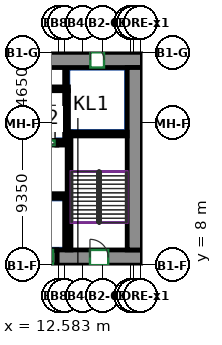
"""IFC4 building model, lengths in metres.
Left out: names, types, materials, properties, quantities, classifications, styles, units other than length and angle.
Written with IfcOpenShell. Run it as: python <this file> out.ifc"""

import sys

from ifc_helpers import new_model, si_unit, direction, frame, frame_2d, origin, place, context, subcontext, project, spatial, rectangle, extrude, source, transform, mapped, element, fill, save


model = new_model("IFC4")
c1 = context("Model", 3, precision=1e-05, world=origin(), true_north=direction((0.0, 1.0)))
c2 = subcontext(c1, "Body", "Model", "MODEL_VIEW")
j1 = project(units=[si_unit("LENGTHUNIT", "METRE"), si_unit("PLANEANGLEUNIT", "RADIAN")], contexts=[c1])
p1 = place(None, origin())
s1 = spatial("IfcSite", under=j1, at=p1, CompositionType="ELEMENT")
p2 = place(p1, origin())
s2 = spatial("IfcBuilding", under=s1, at=p2, CompositionType="ELEMENT")
p3 = place(p2, origin())
s3 = spatial("IfcBuildingStorey", under=s2, at=p3, CompositionType="ELEMENT", Elevation=0.0)
m1 = source(origin(), c2, "Body", "SweptSolid", [
    extrude(rectangle(XDim=5.63, YDim=1.0, at=frame_2d((2.815, 0.0))), origin(), (0.0, 0.0, 1.0), 8.6),
])
p4 = place(p3, frame((12.47, 8.5, 0.0), z_axis=(0.0, 0.0, 1.0), x_axis=(1.0, 0.0, 0.0)))
e1 = element("IfcWall", 1, at=p4, inside=s3, PredefinedType="SHEAR", context=c2, shape_type="MappedRepresentation", body=[
    mapped(m1, transform((0.0, 0.0, 0.0))),
])
p5 = place(p4, frame((2.18, 0.0, 0.0)))
e2 = element("IfcOpeningElement", 2, at=p5, cuts=e1, PredefinedType="OPENING", context=c2, shape_type="SweptSolid", body=[
    extrude(rectangle(XDim=1.2, YDim=2.1, at=frame_2d((0.6, 1.05))), frame((0.0, 0.51, 0.0), z_axis=(0.0, -1.0, 0.0), x_axis=(1.0, 0.0, 0.0)), (0.0, 0.0, 1.0), 1.02),
])
m2 = source(origin(), c2, "Body", "SweptSolid", [
    extrude(rectangle(XDim=34.1, YDim=1.0, at=frame_2d((17.05, 0.0))), origin(), (0.0, 0.0, 1.0), 8.6),
])
p6 = place(p3, frame((-16.0, 21.5, 0.0), z_axis=(0.0, 0.0, 1.0), x_axis=(1.0, 0.0, 0.0)))
e3 = element("IfcWall", 3, at=p6, inside=s3, PredefinedType="SHEAR", context=c2, shape_type="MappedRepresentation", body=[
    mapped(m2, transform((0.0, 0.0, 0.0))),
])
p7 = place(p6, frame((8.52, 0.0, 0.0)))
e4 = element("IfcOpeningElement", 4, at=p7, cuts=e3, PredefinedType="OPENING", context=c2, shape_type="SweptSolid", body=[
    extrude(rectangle(XDim=0.9, YDim=2.1, at=frame_2d((0.45, 1.05))), frame((0.0, 0.51, 0.0), z_axis=(0.0, -1.0, 0.0), x_axis=(1.0, 0.0, 0.0)), (0.0, 0.0, 1.0), 1.02),
])
p8 = place(p6, frame((14.55, 0.0, 0.0)))
e5 = element("IfcOpeningElement", 5, at=p8, cuts=e3, PredefinedType="OPENING", context=c2, shape_type="SweptSolid", body=[
    extrude(rectangle(XDim=0.9, YDim=2.1, at=frame_2d((0.45, 1.05))), frame((0.0, 0.51, 0.0), z_axis=(0.0, -1.0, 0.0), x_axis=(1.0, 0.0, 0.0)), (0.0, 0.0, 1.0), 1.02),
])
p9 = place(p6, frame((19.374, 0.0, 0.0)))
e6 = element("IfcOpeningElement", 6, at=p9, cuts=e3, PredefinedType="OPENING", context=c2, shape_type="SweptSolid", body=[
    extrude(rectangle(XDim=0.9, YDim=2.1, at=frame_2d((0.45, 1.05))), frame((0.0, 0.51, 0.0), z_axis=(0.0, -1.0, 0.0), x_axis=(1.0, 0.0, 0.0)), (0.0, 0.0, 1.0), 1.02),
])
p10 = place(p6, frame((25.404, 0.0, 0.0)))
e7 = element("IfcOpeningElement", 7, at=p10, cuts=e3, PredefinedType="OPENING", context=c2, shape_type="SweptSolid", body=[
    extrude(rectangle(XDim=0.9, YDim=2.1, at=frame_2d((0.45, 1.05))), frame((0.0, 0.51, 0.0), z_axis=(0.0, -1.0, 0.0), x_axis=(1.0, 0.0, 0.0)), (0.0, 0.0, 1.0), 1.02),
])
p11 = place(p6, frame((2.525, 0.0, 0.0)))
e8 = element("IfcOpeningElement", 8, at=p11, cuts=e3, PredefinedType="OPENING", context=c2, shape_type="SweptSolid", body=[
    extrude(rectangle(XDim=0.9, YDim=2.1, at=frame_2d((0.45, 1.05))), frame((0.0, 0.51, 0.0), z_axis=(0.0, -1.0, 0.0), x_axis=(1.0, 0.0, 0.0)), (0.0, 0.0, 1.0), 1.02),
])
p12 = place(p6, frame((30.675, 0.0, 0.0)))
e9 = element("IfcOpeningElement", 9, at=p12, cuts=e3, PredefinedType="OPENING", context=c2, shape_type="SweptSolid", body=[
    extrude(rectangle(XDim=0.9, YDim=2.1, at=frame_2d((0.45, 1.05))), frame((0.0, 0.51, 0.0), z_axis=(0.0, -1.0, 0.0), x_axis=(1.0, 0.0, 0.0)), (0.0, 0.0, 1.0), 1.02),
])
m3 = source(origin(), c2, "Body", "SweptSolid", [
    extrude(rectangle(XDim=12.0, YDim=1.0, at=frame_2d((6.0, 0.0))), origin(), (0.0, 0.0, 1.0), 8.6),
])
p13 = place(p3, frame((17.6, 9.0, 0.0), z_axis=(0.0, 0.0, 1.0), x_axis=(0.0, 1.0, 0.0)))
e10 = element("IfcWall", 10, at=p13, inside=s3, PredefinedType="SHEAR", context=c2, shape_type="MappedRepresentation", body=[
    mapped(m3, transform((0.0, 0.0, 0.0))),
])
m4 = source(origin(), c2, "Body", "SweptSolid", [
    extrude(rectangle(XDim=7.75, YDim=0.25, at=frame_2d((3.875, 0.0))), origin(), (0.0, 0.0, 1.0), 8.6),
])
p14 = place(p3, frame((13.275, 9.0, 0.0), z_axis=(0.0, 0.0, 1.0), x_axis=(0.0, 1.0, 0.0)))
e11 = element("IfcWall", 11, at=p14, inside=s3, PredefinedType="SHEAR", context=c2, shape_type="MappedRepresentation", body=[
    mapped(m4, transform((0.0, 0.0, 0.0))),
])
m5 = source(origin(), c2, "Body", "SweptSolid", [
    extrude(rectangle(XDim=3.7, YDim=0.25, at=frame_2d((1.85, 0.0))), origin(), (0.0, 0.0, 1.0), 8.6),
])
p15 = place(p3, frame((13.4, 16.625, 0.0), z_axis=(0.0, 0.0, 1.0), x_axis=(1.0, 0.0, 0.0)))
e12 = element("IfcWall", 12, at=p15, inside=s3, PredefinedType="SHEAR", context=c2, shape_type="MappedRepresentation", body=[
    mapped(m5, transform((0.0, 0.0, 0.0))),
])
m6 = source(origin(), c2, "Body", "SweptSolid", [
    extrude(rectangle(XDim=2.82, YDim=0.3, at=frame_2d((1.41, 0.0))), origin(), (0.0, 0.0, 1.0), 8.6),
])
p16 = place(p3, frame((10.29, 12.55, 0.0), z_axis=(0.0, 0.0, 1.0), x_axis=(1.0, 0.0, 0.0)))
e13 = element("IfcWall", 13, at=p16, inside=s3, PredefinedType="SHEAR", context=c2, shape_type="MappedRepresentation", body=[
    mapped(m6, transform((0.0, 0.0, 0.0))),
])
m7 = source(origin(), c2, "Body", "SweptSolid", [
    extrude(rectangle(XDim=0.64, YDim=0.3, at=frame_2d((0.32, 0.0))), origin(), (0.0, 0.0, 1.0), 8.6),
])
p17 = place(p3, frame((12.47, 16.05, 0.0), z_axis=(0.0, 0.0, 1.0), x_axis=(1.0, 0.0, 0.0)))
e14 = element("IfcWall", 14, at=p17, inside=s3, PredefinedType="SHEAR", context=c2, shape_type="MappedRepresentation", body=[
    mapped(m7, transform((0.0, 0.0, 0.0))),
])
m8 = source(origin(), c2, "Body", "SweptSolid", [
    extrude(rectangle(XDim=1.4, YDim=1.0, at=frame_2d((0.7, 0.0))), origin(), (0.0, 0.0, 1.0), 4.65),
])
p18 = place(p3, frame((11.07, 8.5, 3.95), z_axis=(0.0, 0.0, 1.0), x_axis=(1.0, 0.0, 0.0)))
e15 = element("IfcWall", 15, at=p18, inside=s3, PredefinedType="SHEAR", context=c2, shape_type="MappedRepresentation", body=[
    mapped(m8, transform((0.0, 0.0, 0.0))),
])
m9 = source(origin(), c2, "Body", "SweptSolid", [
    extrude(rectangle(XDim=1.4, YDim=0.3, at=frame_2d((0.7, 0.0))), origin(), (0.0, 0.0, 1.0), 8.6),
])
p19 = place(p3, frame((11.07, 16.05, 0.0), z_axis=(0.0, 0.0, 1.0), x_axis=(1.0, 0.0, 0.0)))
e16 = element("IfcWall", 16, at=p19, inside=s3, PredefinedType="PARTITIONING", context=c2, shape_type="MappedRepresentation", body=[
    mapped(m9, transform((0.0, 0.0, 0.0))),
])
p20 = place(p19, frame((0.15, 0.0, 0.0)))
e17 = element("IfcOpeningElement", 17, at=p20, cuts=e16, PredefinedType="OPENING", context=c2, shape_type="SweptSolid", body=[
    extrude(rectangle(XDim=1.1, YDim=2.1, at=frame_2d((0.55, 1.05))), frame((0.0, 0.16, 0.0), z_axis=(0.0, -1.0, 0.0), x_axis=(1.0, 0.0, 0.0)), (0.0, 0.0, 1.0), 0.32),
])
m10 = source(origin(), c2, "Body", "SweptSolid", [
    extrude(rectangle(XDim=24.37, YDim=0.25, at=frame_2d((12.185, 0.0))), origin(), (0.0, 0.0, 1.0), 8.6),
])
p21 = place(p3, frame((-11.135, 19.6, 0.0), z_axis=(0.0, 0.0, 1.0), x_axis=(1.0, 0.0, 0.0)))
e18 = element("IfcWall", 18, at=p21, inside=s3, PredefinedType="PARTITIONING", context=c2, shape_type="MappedRepresentation", body=[
    mapped(m10, transform((0.0, 0.0, 0.0))),
])
m11 = source(origin(), c2, "Body", "SweptSolid", [
    extrude(rectangle(XDim=3.275, YDim=0.165, at=frame_2d((1.638, 0.0))), origin(), (0.0, 0.0, 1.0), 8.6),
])
p22 = place(p3, frame((13.067, 16.2, 0.0), z_axis=(0.0, 0.0, 1.0), x_axis=(0.0, 1.0, 0.0)))
e19 = element("IfcWall", 19, at=p22, inside=s3, PredefinedType="PARTITIONING", context=c2, shape_type="MappedRepresentation", body=[
    mapped(m11, transform((0.0, 0.0, 0.0))),
])
m12 = source(origin(), c2, "Body", "SweptSolid", [
    extrude(rectangle(XDim=1.275, YDim=0.165, at=frame_2d((0.637, 0.0))), origin(), (0.0, 0.0, 1.0), 8.6),
])
p23 = place(p3, frame((13.067, 19.725, 0.0), z_axis=(0.0, 0.0, 1.0), x_axis=(0.0, 1.0, 0.0)))
e20 = element("IfcWall", 20, at=p23, inside=s3, PredefinedType="PARTITIONING", context=c2, shape_type="MappedRepresentation", body=[
    mapped(m12, transform((0.0, 0.0, 0.0))),
])
m13 = source(origin(), c2, "Body", "SweptSolid", [
    extrude(rectangle(XDim=2.725, YDim=0.085, at=frame_2d((1.363, 0.0))), origin(), (0.0, 0.0, 1.0), 8.6),
])
p24 = place(p3, frame((13.192, 16.75, 0.0), z_axis=(0.0, 0.0, 1.0), x_axis=(0.0, 1.0, 0.0)))
e21 = element("IfcWall", 21, at=p24, inside=s3, PredefinedType="PARTITIONING", context=c2, shape_type="MappedRepresentation", body=[
    mapped(m13, transform((0.0, 0.0, 0.0))),
])
m14 = source(origin(), c2, "Body", "SweptSolid", [
    extrude(rectangle(XDim=3.4, YDim=0.165, at=frame_2d((1.7, 0.0))), origin(), (0.0, 0.0, 1.0), 8.6),
])
p25 = place(p3, frame((13.067, 9.0, 0.0), z_axis=(0.0, 0.0, 1.0), x_axis=(0.0, 1.0, 0.0)))
e22 = element("IfcWall", 22, at=p25, inside=s3, PredefinedType="PARTITIONING", context=c2, shape_type="MappedRepresentation", body=[
    mapped(m14, transform((0.0, 0.0, 0.0))),
])
m15 = source(origin(), c2, "Body", "SweptSolid", [
    extrude(rectangle(XDim=1.4, YDim=1.0, at=frame_2d((0.7, 0.0))), origin(), (0.0, 0.0, 1.0), 2.7),
])
p26 = place(p3, frame((11.07, 8.5, 0.0), z_axis=(0.0, 0.0, 1.0), x_axis=(1.0, 0.0, 0.0)))
e23 = element("IfcWall", 23, at=p26, inside=s3, PredefinedType="PARTITIONING", context=c2, shape_type="MappedRepresentation", body=[
    mapped(m15, transform((0.0, 0.0, 0.0))),
])
p27 = place(p26, frame((0.25, 0.0, 0.0)))
e24 = element("IfcOpeningElement", 24, at=p27, cuts=e23, PredefinedType="OPENING", context=c2, shape_type="SweptSolid", body=[
    extrude(rectangle(XDim=0.9, YDim=2.1, at=frame_2d((0.45, 1.05))), frame((0.0, 0.51, 0.0), z_axis=(0.0, -1.0, 0.0), x_axis=(1.0, 0.0, 0.0)), (0.0, 0.0, 1.0), 1.02),
])
p28 = place(p27, origin())
e25 = element("IfcDoor", 25, at=p28, inside=s3, OperationType="SLIDING_TO_LEFT", PredefinedType="DOOR", context=c2, shape_type="SweptSolid", body=[
    extrude(rectangle(XDim=0.9, YDim=2.1, at=frame_2d((0.45, 1.05))), frame((0.0, 0.405, 0.0), z_axis=(0.0, -1.0, 0.0), x_axis=(1.0, 0.0, 0.0)), (0.0, 0.0, 1.0), 0.05),
])
fill(e24, e25)
p29 = place(p20, origin())
e26 = element("IfcDoor", 26, at=p29, inside=s3, OperationType="DOUBLE_DOOR_SLIDING", PredefinedType="DOOR", context=c2, shape_type="SweptSolid", body=[
    extrude(rectangle(XDim=1.1, YDim=2.1, at=frame_2d((0.55, 1.05))), frame((0.0, 0.025, 0.0), z_axis=(0.0, -1.0, 0.0), x_axis=(1.0, 0.0, 0.0)), (0.0, 0.0, 1.0), 0.05),
])
fill(e17, e26)
p30 = place(p12, origin())
e27 = element("IfcDoor", 27, at=p30, inside=s3, OperationType="SINGLE_SWING_LEFT", PredefinedType="DOOR", context=c2, shape_type="SweptSolid", body=[
    extrude(rectangle(XDim=0.9, YDim=2.1, at=frame_2d((0.45, 1.05))), frame((0.0, -0.355, 0.0), z_axis=(0.0, -1.0, 0.0), x_axis=(1.0, 0.0, 0.0)), (0.0, 0.0, 1.0), 0.05),
])
fill(e9, e27)
p31 = place(p5, origin())
e28 = element("IfcDoor", 28, at=p31, inside=s3, OperationType="DOUBLE_DOOR_SINGLE_SWING", PredefinedType="DOOR", context=c2, shape_type="SweptSolid", body=[
    extrude(rectangle(XDim=1.2, YDim=2.1, at=frame_2d((0.6, 1.05))), frame((0.0, 0.405, 0.0), z_axis=(0.0, -1.0, 0.0), x_axis=(1.0, 0.0, 0.0)), (0.0, 0.0, 1.0), 0.05),
])
fill(e2, e28)
save(model, sys.argv[1])
